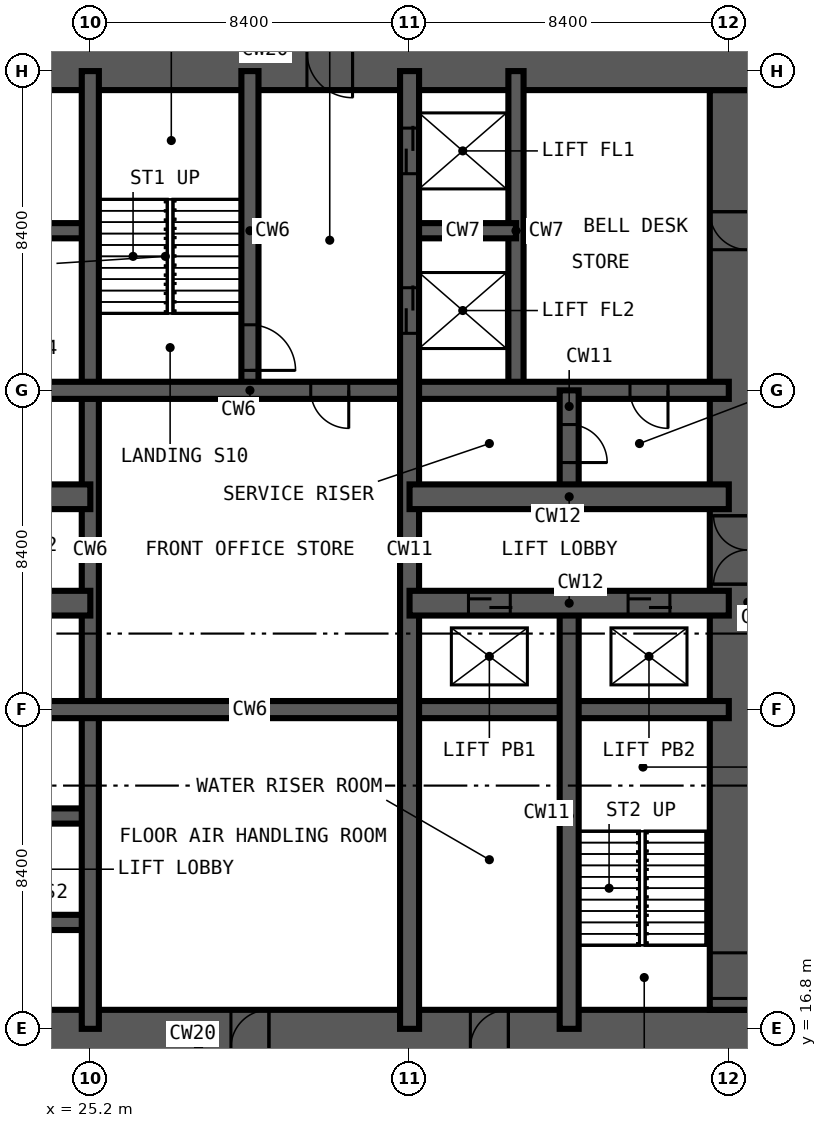
"""IFC4 building model, lengths in metres.
Left out: names, types, materials, properties, quantities, classifications, styles, units other than length and angle.
Written with IfcOpenShell. Run it as: python <this file> out.ifc"""

import sys

from ifc_helpers import new_model, si_unit, direction, frame, frame_2d, origin, place, context, subcontext, project, spatial, rectangle, extrude, element, fill, save


model = new_model("IFC4")
c1 = context("Model", 3, precision=1e-05, world=origin(), true_north=direction((0.0, 1.0)))
c2 = subcontext(c1, "Body", "Model", "MODEL_VIEW")
j1 = project(units=[si_unit("LENGTHUNIT", "METRE"), si_unit("PLANEANGLEUNIT", "RADIAN")], contexts=[c1])
p1 = place(None, origin())
s1 = spatial("IfcSite", under=j1, at=p1, CompositionType="ELEMENT")
p2 = place(p1, origin())
s2 = spatial("IfcBuilding", under=s1, at=p2, CompositionType="ELEMENT")
p3 = place(p2, origin())
s3 = spatial("IfcBuildingStorey", under=s2, at=p3, CompositionType="ELEMENT", Elevation=0.0)
p4 = place(p3, frame((15.3, 16.3, -0.3), z_axis=(0.0, 0.0, 1.0), x_axis=(1.0, 0.0, 0.0)))
e1 = element("IfcWall", 1, at=p4, inside=s3, PredefinedType="SHEAR", context=c2, shape_type="SweptSolid", body=[
    extrude(rectangle(XDim=28.2, YDim=2.0, at=frame_2d((14.1, 0.0))), origin(), (0.0, 0.0, 1.0), 6.0),
])
p5 = place(p4, frame((13.6, 0.0, 0.3)))
e2 = element("IfcOpeningElement", 2, at=p5, cuts=e1, PredefinedType="OPENING", context=c2, shape_type="SweptSolid", body=[
    extrude(rectangle(XDim=1.0, YDim=2.1, at=frame_2d((0.5, 1.05))), frame((0.0, 1.01, 0.0), z_axis=(0.0, -1.0, 0.0), x_axis=(1.0, 0.0, 0.0)), (0.0, 0.0, 1.0), 2.02),
])
p6 = place(p4, frame((19.9, 0.0, 0.3)))
e3 = element("IfcOpeningElement", 3, at=p6, cuts=e1, PredefinedType="OPENING", context=c2, shape_type="SweptSolid", body=[
    extrude(rectangle(XDim=1.0, YDim=2.1, at=frame_2d((0.5, 1.05))), frame((0.0, 1.01, 0.0), z_axis=(0.0, -1.0, 0.0), x_axis=(1.0, 0.0, 0.0)), (0.0, 0.0, 1.0), 2.02),
])
p7 = place(p3, frame((42.5, 17.3, -0.3), z_axis=(0.0, 0.0, 1.0), x_axis=(0.0, 1.0, 0.0)))
e4 = element("IfcWall", 4, at=p7, inside=s3, PredefinedType="SHEAR", context=c2, shape_type="SweptSolid", body=[
    extrude(rectangle(XDim=24.2, YDim=2.0, at=frame_2d((12.1, 0.0))), origin(), (0.0, 0.0, 1.0), 6.0),
])
p8 = place(p7, frame((0.3, 0.0, 0.3)))
e5 = element("IfcOpeningElement", 5, at=p8, cuts=e4, PredefinedType="OPENING", context=c2, shape_type="SweptSolid", body=[
    extrude(rectangle(XDim=1.2, YDim=2.2, at=frame_2d((0.6, 1.1))), frame((0.0, 1.01, 0.0), z_axis=(0.0, -1.0, 0.0), x_axis=(1.0, 0.0, 0.0)), (0.0, 0.0, 1.0), 2.02),
])
p9 = place(p7, frame((11.2, 0.0, 0.3)))
e6 = element("IfcOpeningElement", 6, at=p9, cuts=e4, PredefinedType="OPENING", context=c2, shape_type="SweptSolid", body=[
    extrude(rectangle(XDim=1.8, YDim=2.2, at=frame_2d((0.9, 1.1))), frame((0.0, 1.01, 0.0), z_axis=(0.0, -1.0, 0.0), x_axis=(1.0, 0.0, 0.0)), (0.0, 0.0, 1.0), 2.02),
])
p10 = place(p7, frame((20.0, 0.0, 0.3)))
e7 = element("IfcOpeningElement", 7, at=p10, cuts=e4, PredefinedType="OPENING", context=c2, shape_type="SweptSolid", body=[
    extrude(rectangle(XDim=1.0, YDim=2.1, at=frame_2d((0.5, 1.05))), frame((0.0, 1.01, 0.0), z_axis=(0.0, -1.0, 0.0), x_axis=(1.0, 0.0, 0.0)), (0.0, 0.0, 1.0), 2.02),
])
p11 = place(p3, frame((43.5, 42.5, -0.3), z_axis=(0.0, 0.0, 1.0), x_axis=(-1.0, 0.0, 0.0)))
e8 = element("IfcWall", 8, at=p11, inside=s3, PredefinedType="SHEAR", context=c2, shape_type="SweptSolid", body=[
    extrude(rectangle(XDim=28.2, YDim=2.0, at=frame_2d((14.1, 0.0))), origin(), (0.0, 0.0, 1.0), 6.0),
])
p12 = place(p11, frame((22.0, 0.0, 0.3)))
e9 = element("IfcOpeningElement", 9, at=p12, cuts=e8, PredefinedType="OPENING", context=c2, shape_type="SweptSolid", body=[
    extrude(rectangle(XDim=1.0, YDim=2.1, at=frame_2d((0.5, 1.05))), frame((0.0, 1.01, 0.0), z_axis=(0.0, -1.0, 0.0), x_axis=(1.0, 0.0, 0.0)), (0.0, 0.0, 1.0), 2.02),
])
p13 = place(p11, frame((11.4, 0.0, 0.3)))
e10 = element("IfcOpeningElement", 10, at=p13, cuts=e8, PredefinedType="OPENING", context=c2, shape_type="SweptSolid", body=[
    extrude(rectangle(XDim=1.2, YDim=2.2, at=frame_2d((0.6, 1.1))), frame((0.0, 1.01, 0.0), z_axis=(0.0, -1.0, 0.0), x_axis=(1.0, 0.0, 0.0)), (0.0, 0.0, 1.0), 2.02),
])
p14 = place(p3, frame((36.4, 33.6, -0.3), z_axis=(0.0, 0.0, 1.0), x_axis=(0.0, 1.0, 0.0)))
e11 = element("IfcWall", 11, at=p14, inside=s3, PredefinedType="SHEAR", context=c2, shape_type="SweptSolid", body=[
    extrude(rectangle(XDim=8.4, YDim=0.4, at=frame_2d((4.2, 0.0))), origin(), (0.0, 0.0, 1.0), 6.0),
])
p15 = place(p3, frame((16.8, 19.6, -0.3), z_axis=(0.0, 0.0, 1.0), x_axis=(1.0, 0.0, 0.0)))
e12 = element("IfcWall", 12, at=p15, inside=s3, PredefinedType="SHEAR", context=c2, shape_type="SweptSolid", body=[
    extrude(rectangle(XDim=8.4, YDim=0.4, at=frame_2d((4.2, 0.0))), origin(), (0.0, 0.0, 1.0), 6.0),
])
p16 = place(p15, frame((1.55, 0.0, 0.3)))
e13 = element("IfcOpeningElement", 13, at=p16, cuts=e12, PredefinedType="OPENING", context=c2, shape_type="SweptSolid", body=[
    extrude(rectangle(XDim=1.1, YDim=2.2, at=frame_2d((0.55, 1.1))), frame((0.0, 0.21, 0.0), z_axis=(0.0, -1.0, 0.0), x_axis=(1.0, 0.0, 0.0)), (0.0, 0.0, 1.0), 0.42),
])
p17 = place(p15, frame((5.75, 0.0, 0.3)))
e14 = element("IfcOpeningElement", 14, at=p17, cuts=e12, PredefinedType="OPENING", context=c2, shape_type="SweptSolid", body=[
    extrude(rectangle(XDim=1.1, YDim=2.2, at=frame_2d((0.55, 1.1))), frame((0.0, 0.21, 0.0), z_axis=(0.0, -1.0, 0.0), x_axis=(1.0, 0.0, 0.0)), (0.0, 0.0, 1.0), 0.42),
])
p18 = place(p3, frame((16.8, 22.4, -0.3), z_axis=(0.0, 0.0, 1.0), x_axis=(1.0, 0.0, 0.0)))
e15 = element("IfcWall", 15, at=p18, inside=s3, PredefinedType="SHEAR", context=c2, shape_type="SweptSolid", body=[
    extrude(rectangle(XDim=8.4, YDim=0.4, at=frame_2d((4.2, 0.0))), origin(), (0.0, 0.0, 1.0), 6.0),
])
p19 = place(p18, frame((1.55, 0.0, 0.3)))
e16 = element("IfcOpeningElement", 16, at=p19, cuts=e15, PredefinedType="OPENING", context=c2, shape_type="SweptSolid", body=[
    extrude(rectangle(XDim=1.1, YDim=2.2, at=frame_2d((0.55, 1.1))), frame((0.0, 0.21, 0.0), z_axis=(0.0, -1.0, 0.0), x_axis=(1.0, 0.0, 0.0)), (0.0, 0.0, 1.0), 0.42),
])
p20 = place(p18, frame((5.75, 0.0, 0.3)))
e17 = element("IfcOpeningElement", 17, at=p20, cuts=e15, PredefinedType="OPENING", context=c2, shape_type="SweptSolid", body=[
    extrude(rectangle(XDim=1.1, YDim=2.2, at=frame_2d((0.55, 1.1))), frame((0.0, 0.21, 0.0), z_axis=(0.0, -1.0, 0.0), x_axis=(1.0, 0.0, 0.0)), (0.0, 0.0, 1.0), 0.42),
])
p21 = place(p3, frame((16.8, 37.8, -0.3), z_axis=(0.0, 0.0, 1.0), x_axis=(1.0, 0.0, 0.0)))
e18 = element("IfcWall", 18, at=p21, inside=s3, PredefinedType="SHEAR", context=c2, shape_type="SweptSolid", body=[
    extrude(rectangle(XDim=8.4, YDim=0.4, at=frame_2d((4.2, 0.0))), origin(), (0.0, 0.0, 1.0), 6.0),
])
p22 = place(p3, frame((33.6, 37.8, -0.3), z_axis=(0.0, 0.0, 1.0), x_axis=(1.0, 0.0, 0.0)))
e19 = element("IfcWall", 19, at=p22, inside=s3, PredefinedType="SHEAR", context=c2, shape_type="SweptSolid", body=[
    extrude(rectangle(XDim=2.8, YDim=0.4, at=frame_2d((1.4, 0.0))), origin(), (0.0, 0.0, 1.0), 6.0),
])
p23 = place(p3, frame((25.2, 16.8, -0.3), z_axis=(0.0, 0.0, 1.0), x_axis=(0.0, 1.0, 0.0)))
e20 = element("IfcWall", 20, at=p23, inside=s3, PredefinedType="SHEAR", context=c2, shape_type="SweptSolid", body=[
    extrude(rectangle(XDim=25.2, YDim=0.45, at=frame_2d((12.6, 0.0))), origin(), (0.0, 0.0, 1.0), 6.0),
])
p24 = place(p3, frame((29.4, 33.6, -0.3), z_axis=(0.0, 0.0, 1.0), x_axis=(0.0, 1.0, 0.0)))
e21 = element("IfcWall", 21, at=p24, inside=s3, PredefinedType="SHEAR", context=c2, shape_type="SweptSolid", body=[
    extrude(rectangle(XDim=8.4, YDim=0.45, at=frame_2d((4.2, 0.0))), origin(), (0.0, 0.0, 1.0), 6.0),
])
p25 = place(p24, frame((0.525, 0.0, 0.3)))
e22 = element("IfcOpeningElement", 22, at=p25, cuts=e21, PredefinedType="OPENING", context=c2, shape_type="SweptSolid", body=[
    extrude(rectangle(XDim=1.2, YDim=2.2, at=frame_2d((0.6, 1.1))), frame((0.0, 0.235, 0.0), z_axis=(0.0, -1.0, 0.0), x_axis=(1.0, 0.0, 0.0)), (0.0, 0.0, 1.0), 0.47),
])
p26 = place(p3, frame((16.8, 25.2, -0.3), z_axis=(0.0, 0.0, 1.0), x_axis=(1.0, 0.0, 0.0)))
e23 = element("IfcWall", 23, at=p26, inside=s3, PredefinedType="SHEAR", context=c2, shape_type="SweptSolid", body=[
    extrude(rectangle(XDim=25.2, YDim=0.45, at=frame_2d((12.6, 0.0))), origin(), (0.0, 0.0, 1.0), 6.0),
])
p27 = place(p3, frame((16.8, 33.6, -0.3), z_axis=(0.0, 0.0, 1.0), x_axis=(1.0, 0.0, 0.0)))
e24 = element("IfcWall", 24, at=p27, inside=s3, PredefinedType="SHEAR", context=c2, shape_type="SweptSolid", body=[
    extrude(rectangle(XDim=25.2, YDim=0.45, at=frame_2d((12.6, 0.0))), origin(), (0.0, 0.0, 1.0), 6.0),
])
p28 = place(p27, frame((14.2, 0.0, 0.3)))
e25 = element("IfcOpeningElement", 25, at=p28, cuts=e24, PredefinedType="OPENING", context=c2, shape_type="SweptSolid", body=[
    extrude(rectangle(XDim=1.0, YDim=2.1, at=frame_2d((0.5, 1.05))), frame((0.0, 0.235, 0.0), z_axis=(0.0, -1.0, 0.0), x_axis=(1.0, 0.0, 0.0)), (0.0, 0.0, 1.0), 0.47),
])
p29 = place(p27, frame((22.6, 0.0, 0.3)))
e26 = element("IfcOpeningElement", 26, at=p29, cuts=e24, PredefinedType="OPENING", context=c2, shape_type="SweptSolid", body=[
    extrude(rectangle(XDim=1.0, YDim=2.1, at=frame_2d((0.5, 1.05))), frame((0.0, 0.235, 0.0), z_axis=(0.0, -1.0, 0.0), x_axis=(1.0, 0.0, 0.0)), (0.0, 0.0, 1.0), 0.47),
])
p30 = place(p3, frame((33.6, 16.8, -0.3), z_axis=(0.0, 0.0, 1.0), x_axis=(0.0, 1.0, 0.0)))
e27 = element("IfcWall", 27, at=p30, inside=s3, PredefinedType="SHEAR", context=c2, shape_type="SweptSolid", body=[
    extrude(rectangle(XDim=25.2, YDim=0.5, at=frame_2d((12.6, 0.0))), origin(), (0.0, 0.0, 1.0), 6.0),
])
p31 = place(p30, frame((22.5, 0.0, 0.3)))
e28 = element("IfcOpeningElement", 28, at=p31, cuts=e27, PredefinedType="OPENING", context=c2, shape_type="SweptSolid", body=[
    extrude(rectangle(XDim=1.2, YDim=2.2, at=frame_2d((0.6, 1.1))), frame((0.0, 0.26, 0.0), z_axis=(0.0, -1.0, 0.0), x_axis=(1.0, 0.0, 0.0)), (0.0, 0.0, 1.0), 0.52),
])
p32 = place(p30, frame((18.3, 0.0, 0.3)))
e29 = element("IfcOpeningElement", 29, at=p32, cuts=e27, PredefinedType="OPENING", context=c2, shape_type="SweptSolid", body=[
    extrude(rectangle(XDim=1.2, YDim=2.2, at=frame_2d((0.6, 1.1))), frame((0.0, 0.26, 0.0), z_axis=(0.0, -1.0, 0.0), x_axis=(1.0, 0.0, 0.0)), (0.0, 0.0, 1.0), 0.52),
])
p33 = place(p3, frame((37.8, 16.8, -0.3), z_axis=(0.0, 0.0, 1.0), x_axis=(0.0, 1.0, 0.0)))
e30 = element("IfcWall", 30, at=p33, inside=s3, PredefinedType="SHEAR", context=c2, shape_type="SweptSolid", body=[
    extrude(rectangle(XDim=11.2, YDim=0.5, at=frame_2d((5.6, 0.0))), origin(), (0.0, 0.0, 1.0), 6.0),
])
p34 = place(p3, frame((37.8, 30.8, -0.3), z_axis=(0.0, 0.0, 1.0), x_axis=(0.0, 1.0, 0.0)))
e31 = element("IfcWall", 31, at=p34, inside=s3, PredefinedType="SHEAR", context=c2, shape_type="SweptSolid", body=[
    extrude(rectangle(XDim=2.8, YDim=0.5, at=frame_2d((1.4, 0.0))), origin(), (0.0, 0.0, 1.0), 6.0),
])
p35 = place(p34, frame((0.9, 0.0, 0.3)))
e32 = element("IfcOpeningElement", 32, at=p35, cuts=e31, PredefinedType="OPENING", context=c2, shape_type="SweptSolid", body=[
    extrude(rectangle(XDim=1.0, YDim=2.1, at=frame_2d((0.5, 1.05))), frame((0.0, 0.26, 0.0), z_axis=(0.0, -1.0, 0.0), x_axis=(1.0, 0.0, 0.0)), (0.0, 0.0, 1.0), 0.52),
])
p36 = place(p3, frame((16.8, 28.0, -0.3), z_axis=(0.0, 0.0, 1.0), x_axis=(1.0, 0.0, 0.0)))
e33 = element("IfcWall", 33, at=p36, inside=s3, PredefinedType="SHEAR", context=c2, shape_type="SweptSolid", body=[
    extrude(rectangle(XDim=8.4, YDim=0.65, at=frame_2d((4.2, 0.0))), origin(), (0.0, 0.0, 1.0), 6.0),
])
p37 = place(p36, frame((1.55, 0.0, 0.3)))
e34 = element("IfcOpeningElement", 34, at=p37, cuts=e33, PredefinedType="OPENING", context=c2, shape_type="SweptSolid", body=[
    extrude(rectangle(XDim=1.1, YDim=2.2, at=frame_2d((0.55, 1.1))), frame((0.0, 0.335, 0.0), z_axis=(0.0, -1.0, 0.0), x_axis=(1.0, 0.0, 0.0)), (0.0, 0.0, 1.0), 0.67),
])
p38 = place(p36, frame((5.75, 0.0, 0.3)))
e35 = element("IfcOpeningElement", 35, at=p38, cuts=e33, PredefinedType="OPENING", context=c2, shape_type="SweptSolid", body=[
    extrude(rectangle(XDim=1.1, YDim=2.2, at=frame_2d((0.55, 1.1))), frame((0.0, 0.335, 0.0), z_axis=(0.0, -1.0, 0.0), x_axis=(1.0, 0.0, 0.0)), (0.0, 0.0, 1.0), 0.67),
])
p39 = place(p3, frame((33.6, 28.0, -0.3), z_axis=(0.0, 0.0, 1.0), x_axis=(1.0, 0.0, 0.0)))
e36 = element("IfcWall", 36, at=p39, inside=s3, PredefinedType="SHEAR", context=c2, shape_type="SweptSolid", body=[
    extrude(rectangle(XDim=8.4, YDim=0.65, at=frame_2d((4.2, 0.0))), origin(), (0.0, 0.0, 1.0), 6.0),
])
p40 = place(p39, frame((1.55, 0.0, 0.3)))
e37 = element("IfcOpeningElement", 37, at=p40, cuts=e36, PredefinedType="OPENING", context=c2, shape_type="SweptSolid", body=[
    extrude(rectangle(XDim=1.1, YDim=2.2, at=frame_2d((0.55, 1.1))), frame((0.0, 0.335, 0.0), z_axis=(0.0, -1.0, 0.0), x_axis=(1.0, 0.0, 0.0)), (0.0, 0.0, 1.0), 0.67),
])
p41 = place(p39, frame((5.75, 0.0, 0.3)))
e38 = element("IfcOpeningElement", 38, at=p41, cuts=e36, PredefinedType="OPENING", context=c2, shape_type="SweptSolid", body=[
    extrude(rectangle(XDim=1.1, YDim=2.2, at=frame_2d((0.55, 1.1))), frame((0.0, 0.335, 0.0), z_axis=(0.0, -1.0, 0.0), x_axis=(1.0, 0.0, 0.0)), (0.0, 0.0, 1.0), 0.67),
])
p42 = place(p3, frame((16.8, 30.8, -0.3), z_axis=(0.0, 0.0, 1.0), x_axis=(1.0, 0.0, 0.0)))
e39 = element("IfcWall", 39, at=p42, inside=s3, PredefinedType="SHEAR", context=c2, shape_type="SweptSolid", body=[
    extrude(rectangle(XDim=8.4, YDim=0.65, at=frame_2d((4.2, 0.0))), origin(), (0.0, 0.0, 1.0), 6.0),
])
p43 = place(p42, frame((1.55, 0.0, 0.3)))
e40 = element("IfcOpeningElement", 40, at=p43, cuts=e39, PredefinedType="OPENING", context=c2, shape_type="SweptSolid", body=[
    extrude(rectangle(XDim=1.1, YDim=2.2, at=frame_2d((0.55, 1.1))), frame((0.0, 0.335, 0.0), z_axis=(0.0, -1.0, 0.0), x_axis=(1.0, 0.0, 0.0)), (0.0, 0.0, 1.0), 0.67),
])
p44 = place(p42, frame((5.75, 0.0, 0.3)))
e41 = element("IfcOpeningElement", 41, at=p44, cuts=e39, PredefinedType="OPENING", context=c2, shape_type="SweptSolid", body=[
    extrude(rectangle(XDim=1.1, YDim=2.2, at=frame_2d((0.55, 1.1))), frame((0.0, 0.335, 0.0), z_axis=(0.0, -1.0, 0.0), x_axis=(1.0, 0.0, 0.0)), (0.0, 0.0, 1.0), 0.67),
])
p45 = place(p3, frame((33.6, 30.8, -0.3), z_axis=(0.0, 0.0, 1.0), x_axis=(1.0, 0.0, 0.0)))
e42 = element("IfcWall", 42, at=p45, inside=s3, PredefinedType="SHEAR", context=c2, shape_type="SweptSolid", body=[
    extrude(rectangle(XDim=8.4, YDim=0.65, at=frame_2d((4.2, 0.0))), origin(), (0.0, 0.0, 1.0), 6.0),
])
p46 = place(p25, frame((1.2, 0.0, 0.0), z_axis=(0.0, 0.0, 1.0), x_axis=(-1.0, 0.0, 0.0)))
e43 = element("IfcDoor", 43, at=p46, inside=s3, OperationType="SINGLE_SWING_RIGHT", PredefinedType="DOOR", context=c2, shape_type="SweptSolid", body=[
    extrude(rectangle(XDim=1.2, YDim=2.2, at=frame_2d((0.6, 1.1))), frame((0.0, 0.025, 0.0), z_axis=(0.0, -1.0, 0.0), x_axis=(1.0, 0.0, 0.0)), (0.0, 0.0, 1.0), 0.05),
])
fill(e22, e43)
p47 = place(p8, frame((1.2, 0.0, 0.0), z_axis=(0.0, 0.0, 1.0), x_axis=(-1.0, 0.0, 0.0)))
e44 = element("IfcDoor", 44, at=p47, inside=s3, OperationType="SINGLE_SWING_RIGHT", PredefinedType="DOOR", context=c2, shape_type="SweptSolid", body=[
    extrude(rectangle(XDim=1.2, YDim=2.2, at=frame_2d((0.6, 1.1))), frame((0.0, 0.025, 0.0), z_axis=(0.0, -1.0, 0.0), x_axis=(1.0, 0.0, 0.0)), (0.0, 0.0, 1.0), 0.05),
])
fill(e5, e44)
p48 = place(p40, origin())
e45 = element("IfcDoor", 45, at=p48, inside=s3, OperationType="DOUBLE_DOOR_SLIDING", PredefinedType="DOOR", context=c2, shape_type="SweptSolid", body=[
    extrude(rectangle(XDim=1.1, YDim=2.2, at=frame_2d((0.55, 1.1))), frame((0.0, 0.025, 0.0), z_axis=(0.0, -1.0, 0.0), x_axis=(1.0, 0.0, 0.0)), (0.0, 0.0, 1.0), 0.05),
])
fill(e37, e45)
p49 = place(p41, origin())
e46 = element("IfcDoor", 46, at=p49, inside=s3, OperationType="DOUBLE_DOOR_SLIDING", PredefinedType="DOOR", context=c2, shape_type="SweptSolid", body=[
    extrude(rectangle(XDim=1.1, YDim=2.2, at=frame_2d((0.55, 1.1))), frame((0.0, 0.025, 0.0), z_axis=(0.0, -1.0, 0.0), x_axis=(1.0, 0.0, 0.0)), (0.0, 0.0, 1.0), 0.05),
])
fill(e38, e46)
p50 = place(p31, origin())
e47 = element("IfcDoor", 47, at=p50, inside=s3, OperationType="DOUBLE_DOOR_SLIDING", PredefinedType="DOOR", context=c2, shape_type="SweptSolid", body=[
    extrude(rectangle(XDim=1.2, YDim=2.2, at=frame_2d((0.6, 1.1))), frame((0.0, 0.025, 0.0), z_axis=(0.0, -1.0, 0.0), x_axis=(1.0, 0.0, 0.0)), (0.0, 0.0, 1.0), 0.05),
])
fill(e28, e47)
p51 = place(p32, origin())
e48 = element("IfcDoor", 48, at=p51, inside=s3, OperationType="DOUBLE_DOOR_SLIDING", PredefinedType="DOOR", context=c2, shape_type="SweptSolid", body=[
    extrude(rectangle(XDim=1.2, YDim=2.2, at=frame_2d((0.6, 1.1))), frame((0.0, 0.025, 0.0), z_axis=(0.0, -1.0, 0.0), x_axis=(1.0, 0.0, 0.0)), (0.0, 0.0, 1.0), 0.05),
])
fill(e29, e48)
p52 = place(p28, frame((1.0, 0.0, 0.0), z_axis=(0.0, 0.0, 1.0), x_axis=(-1.0, 0.0, 0.0)))
e49 = element("IfcDoor", 49, at=p52, inside=s3, OperationType="SINGLE_SWING_LEFT", PredefinedType="DOOR", context=c2, shape_type="SweptSolid", body=[
    extrude(rectangle(XDim=1.0, YDim=2.1, at=frame_2d((0.5, 1.05))), frame((0.0, 0.025, 0.0), z_axis=(0.0, -1.0, 0.0), x_axis=(1.0, 0.0, 0.0)), (0.0, 0.0, 1.0), 0.05),
])
fill(e25, e49)
p53 = place(p35, frame((1.0, 0.0, 0.0), z_axis=(0.0, 0.0, 1.0), x_axis=(-1.0, 0.0, 0.0)))
e50 = element("IfcDoor", 50, at=p53, inside=s3, OperationType="SINGLE_SWING_RIGHT", PredefinedType="DOOR", context=c2, shape_type="SweptSolid", body=[
    extrude(rectangle(XDim=1.0, YDim=2.1, at=frame_2d((0.5, 1.05))), frame((0.0, 0.025, 0.0), z_axis=(0.0, -1.0, 0.0), x_axis=(1.0, 0.0, 0.0)), (0.0, 0.0, 1.0), 0.05),
])
fill(e32, e50)
p54 = place(p29, frame((1.0, 0.0, 0.0), z_axis=(0.0, 0.0, 1.0), x_axis=(-1.0, 0.0, 0.0)))
e51 = element("IfcDoor", 51, at=p54, inside=s3, OperationType="SINGLE_SWING_LEFT", PredefinedType="DOOR", context=c2, shape_type="SweptSolid", body=[
    extrude(rectangle(XDim=1.0, YDim=2.1, at=frame_2d((0.5, 1.05))), frame((0.0, 0.025, 0.0), z_axis=(0.0, -1.0, 0.0), x_axis=(1.0, 0.0, 0.0)), (0.0, 0.0, 1.0), 0.05),
])
fill(e26, e51)
p55 = place(p9, origin())
e52 = element("IfcDoor", 52, at=p55, inside=s3, OperationType="DOUBLE_DOOR_DOUBLE_SWING", PredefinedType="DOOR", context=c2, shape_type="SweptSolid", body=[
    extrude(rectangle(XDim=1.8, YDim=2.2, at=frame_2d((0.9, 1.1))), frame((0.0, 0.025, 0.0), z_axis=(0.0, -1.0, 0.0), x_axis=(1.0, 0.0, 0.0)), (0.0, 0.0, 1.0), 0.05),
])
fill(e6, e52)
p56 = place(p13, origin())
e53 = element("IfcDoor", 53, at=p56, inside=s3, OperationType="SINGLE_SWING_LEFT", PredefinedType="DOOR", context=c2, shape_type="SweptSolid", body=[
    extrude(rectangle(XDim=1.2, YDim=2.2, at=frame_2d((0.6, 1.1))), frame((0.0, 0.025, 0.0), z_axis=(0.0, -1.0, 0.0), x_axis=(1.0, 0.0, 0.0)), (0.0, 0.0, 1.0), 0.05),
])
fill(e10, e53)
p57 = place(p10, origin())
e54 = element("IfcDoor", 54, at=p57, inside=s3, OperationType="SINGLE_SWING_RIGHT", PredefinedType="DOOR", context=c2, shape_type="SweptSolid", body=[
    extrude(rectangle(XDim=1.0, YDim=2.1, at=frame_2d((0.5, 1.05))), frame((0.0, 0.025, 0.0), z_axis=(0.0, -1.0, 0.0), x_axis=(1.0, 0.0, 0.0)), (0.0, 0.0, 1.0), 0.05),
])
fill(e7, e54)
p58 = place(p5, origin())
e55 = element("IfcDoor", 55, at=p58, inside=s3, OperationType="SINGLE_SWING_RIGHT", PredefinedType="DOOR", context=c2, shape_type="SweptSolid", body=[
    extrude(rectangle(XDim=1.0, YDim=2.1, at=frame_2d((0.5, 1.05))), frame((0.0, 0.025, 0.0), z_axis=(0.0, -1.0, 0.0), x_axis=(1.0, 0.0, 0.0)), (0.0, 0.0, 1.0), 0.05),
])
fill(e2, e55)
p59 = place(p6, origin())
e56 = element("IfcDoor", 56, at=p59, inside=s3, OperationType="SINGLE_SWING_RIGHT", PredefinedType="DOOR", context=c2, shape_type="SweptSolid", body=[
    extrude(rectangle(XDim=1.0, YDim=2.1, at=frame_2d((0.5, 1.05))), frame((0.0, 0.025, 0.0), z_axis=(0.0, -1.0, 0.0), x_axis=(1.0, 0.0, 0.0)), (0.0, 0.0, 1.0), 0.05),
])
fill(e3, e56)
save(model, sys.argv[1])
